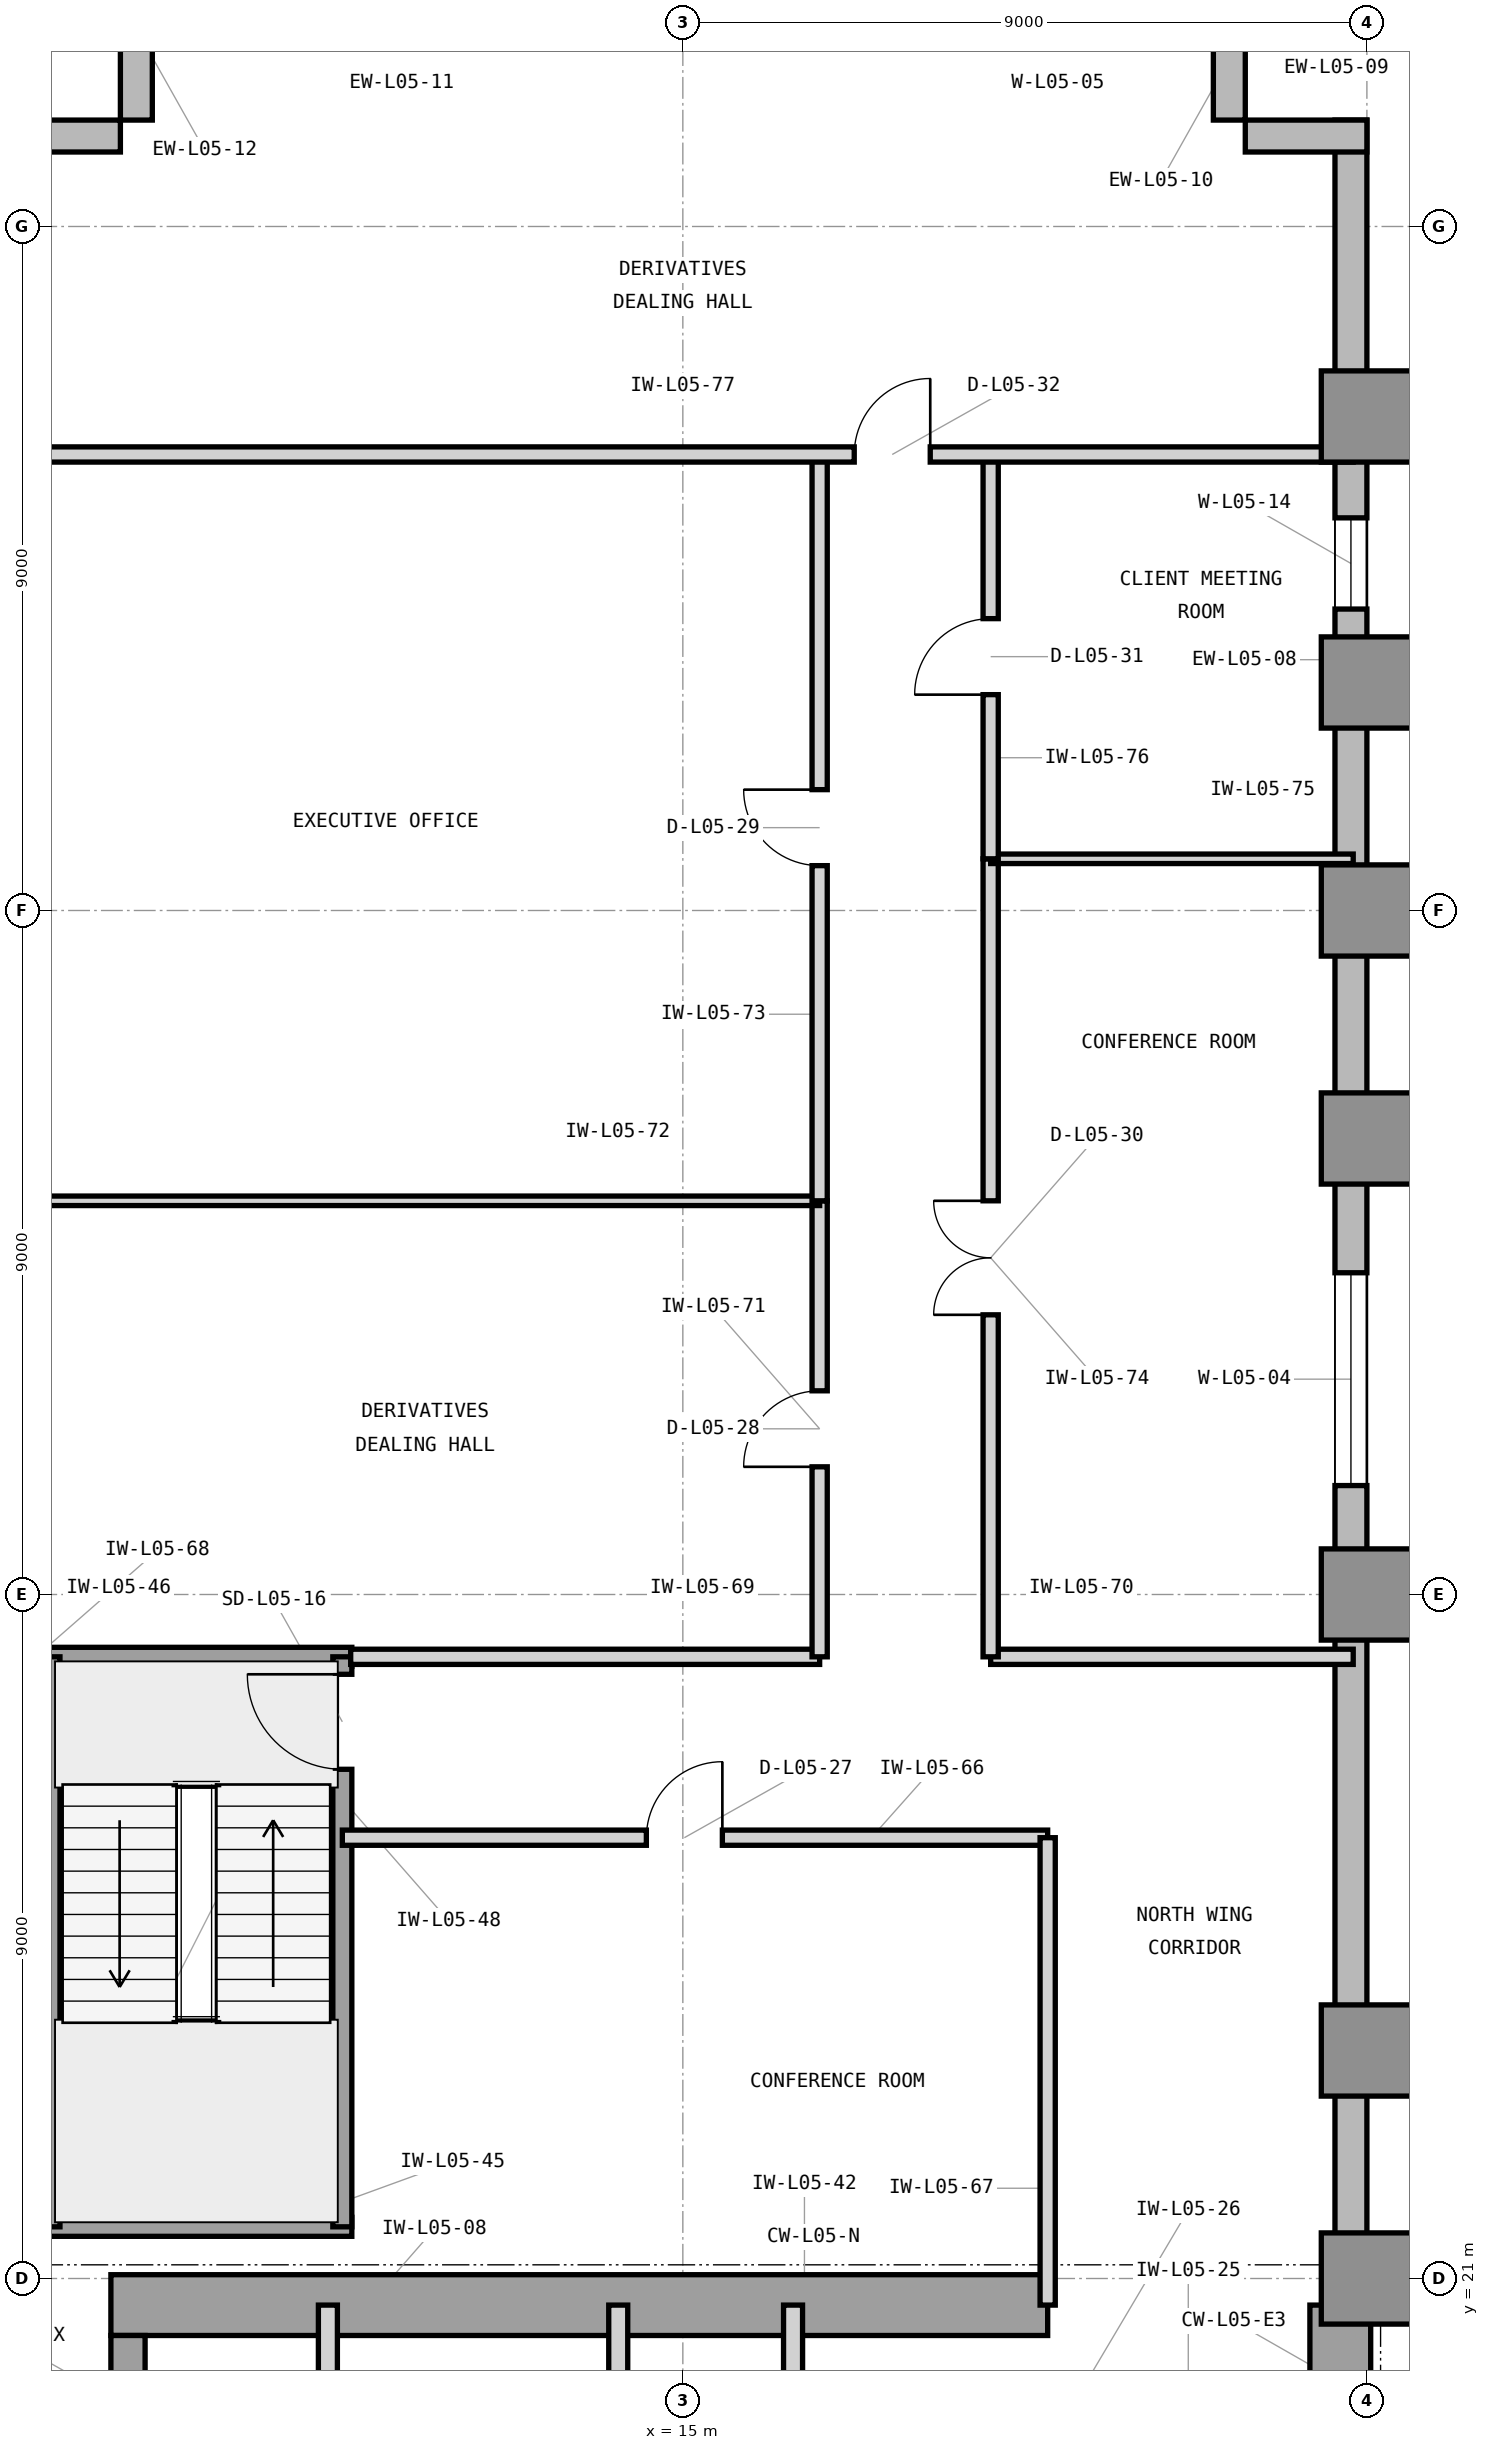
"""IFC4 building model, lengths in metres.
Left out: names, types, materials, properties, quantities, classifications, styles, units other than length and angle.
Written with IfcOpenShell. Run it as: python <this file> out.ifc"""

import sys

from ifc_helpers import new_model, si_unit, direction, frame, frame_2d, origin, origin_2d, place, context, subcontext, project, spatial, rectangle, extrude, element, fill, save


model = new_model("IFC4")
c1 = context("Model", 3, precision=1e-05, world=origin(), true_north=direction((0.0, 1.0)))
c2 = subcontext(c1, "Body", "Model", "MODEL_VIEW")
j1 = project(units=[si_unit("LENGTHUNIT", "METRE"), si_unit("PLANEANGLEUNIT", "RADIAN")], contexts=[c1])
p1 = place(None, origin())
s1 = spatial("IfcSite", under=j1, at=p1, CompositionType="ELEMENT")
p2 = place(p1, origin())
s2 = spatial("IfcBuilding", under=s1, at=p2, CompositionType="ELEMENT")
p3 = place(p2, frame((0.0, 0.0, 25.8)))
s3 = spatial("IfcBuildingStorey", under=s2, at=p3, CompositionType="ELEMENT", Elevation=25.8)
p4 = place(p3, frame((7.475, 20.65, 0.0), z_axis=(0.0, 0.0, 1.0), x_axis=(1.0, 0.0, 0.0)))
e1 = element("IfcWall", 1, at=p4, inside=s3, PredefinedType="SHEAR", context=c2, shape_type="SweptSolid", body=[
    extrude(rectangle(XDim=12.325, YDim=0.8, at=frame_2d((6.163, 0.0))), origin(), (0.0, 0.0, 1.0), 4.2),
])
p5 = place(p3, frame((23.65, 16.6, 0.0), z_axis=(0.0, 0.0, 1.0), x_axis=(0.0, 1.0, 0.0)))
e2 = element("IfcWall", 2, at=p5, inside=s3, PredefinedType="SHEAR", context=c2, shape_type="SweptSolid", body=[
    extrude(rectangle(XDim=4.05, YDim=0.8, at=frame_2d((2.025, 0.0))), origin(), (0.0, 0.0, 1.0), 4.2),
])
p6 = place(p3, frame((7.7, 19.575, 0.0), z_axis=(0.0, 0.0, 1.0), x_axis=(0.0, 1.0, 0.0)))
e3 = element("IfcWall", 3, at=p6, inside=s3, PredefinedType="SHEAR", context=c2, shape_type="SweptSolid", body=[
    extrude(rectangle(XDim=0.675, YDim=0.45, at=frame_2d((0.337, 0.0))), origin(), (0.0, 0.0, 1.0), 4.2),
])
for number, where, z_axis, x_axis in (
    (4, (24.0, 21.0, 0.0), (0.0, 0.0, 1.0), (1.0, 0.0, 0.0)),
    (5, (24.0, 24.0, 0.0), (0.0, 0.0, 1.0), (1.0, 0.0, 0.0)),
    (6, (24.0, 30.0, 0.0), (0.0, 0.0, 1.0), (1.0, 0.0, 0.0)),
    (7, (24.0, 36.0, 0.0), (0.0, 0.0, 1.0), (1.0, 0.0, 0.0)),
    (8, (24.0, 39.0, 0.0), (0.0, 0.0, 1.0), (1.0, 0.0, 0.0)),
    (9, (24.0, 42.0, 0.0), (0.0, 0.0, 1.0), (1.0, 0.0, 0.0)),
    (10, (24.0, 45.5, 0.0), (0.0, 0.0, 1.0), (1.0, 0.0, 0.0)),
):
    element("IfcColumn", number, at=place(p3, frame(where, z_axis=z_axis, x_axis=x_axis)), inside=s3, PredefinedType="COLUMN", context=c2, shape_type="SweptSolid", body=[
        extrude(rectangle(XDim=1.2, YDim=1.2, at=origin_2d()), origin(), (0.0, 0.0, 1.0), 4.2),
    ])
p7 = place(p3, frame((23.79, 21.0, 0.0), z_axis=(0.0, 0.0, 1.0), x_axis=(0.0, 1.0, 0.0)))
e11 = element("IfcWall", 11, at=p7, inside=s3, PredefinedType="STANDARD", context=c2, shape_type="SweptSolid", body=[
    extrude(rectangle(XDim=28.4, YDim=0.42, at=frame_2d((14.2, 0.0))), origin(), (0.0, 0.0, 1.0), 3.98),
])
p8 = place(p7, frame((10.433, 0.0, 0.85)))
e12 = element("IfcOpeningElement", 12, at=p8, cuts=e11, PredefinedType="OPENING", context=c2, shape_type="SweptSolid", body=[
    extrude(rectangle(XDim=2.8, YDim=2.45, at=frame_2d((1.4, 1.225))), frame((0.0, 0.22, 0.0), z_axis=(0.0, -1.0, 0.0), x_axis=(1.0, 0.0, 0.0)), (0.0, 0.0, 1.0), 0.44),
])
p9 = place(p7, frame((21.966, 0.0, 0.85)))
e13 = element("IfcOpeningElement", 13, at=p9, cuts=e11, PredefinedType="OPENING", context=c2, shape_type="SweptSolid", body=[
    extrude(rectangle(XDim=1.2, YDim=2.45, at=frame_2d((0.6, 1.225))), frame((0.0, 0.22, 0.0), z_axis=(0.0, -1.0, 0.0), x_axis=(1.0, 0.0, 0.0)), (0.0, 0.0, 1.0), 0.44),
])
for number, where, z_axis, x_axis in (
    (14, (24.0, 49.19, 0.0), (0.0, 0.0, 1.0), (-1.0, 0.0, 0.0)),
    (15, (22.19, 49.4, 0.0), (0.0, 0.0, 1.0), (0.0, 1.0, 0.0)),
    (16, (7.81, 51.0, 0.0), (0.0, 0.0, 1.0), (0.0, -1.0, 0.0)),
    (17, (7.6, 49.19, 0.0), (0.0, 0.0, 1.0), (-1.0, 0.0, 0.0)),
):
    element("IfcWall", number, at=place(p3, frame(where, z_axis=z_axis, x_axis=x_axis)), inside=s3, PredefinedType="STANDARD", context=c2, shape_type="SweptSolid", body=[
        extrude(rectangle(XDim=1.6, YDim=0.42, at=frame_2d((0.8, 0.0))), origin(), (0.0, 0.0, 1.0), 3.98),
    ])
p10 = place(p3, frame((10.33, 19.45, 0.0), z_axis=(0.0, 0.0, 1.0), x_axis=(0.0, 1.0, 0.0)))
e18 = element("IfcWall", 18, at=p10, inside=s3, PredefinedType="PARTITIONING", context=c2, shape_type="SweptSolid", body=[
    extrude(rectangle(XDim=1.2, YDim=0.25, at=frame_2d((0.6, 0.0))), origin(), (0.0, 0.0, 1.0), 3.114),
])
for number, where, z_axis, x_axis in (
    (19, (14.15, 16.7, 0.0), (0.0, 0.0, 1.0), (0.0, 1.0, 0.0)),
    (20, (16.45, 16.7, 0.0), (0.0, 0.0, 1.0), (0.0, 1.0, 0.0)),
):
    element("IfcWall", number, at=place(p3, frame(where, z_axis=z_axis, x_axis=x_axis)), inside=s3, PredefinedType="PARTITIONING", context=c2, shape_type="SweptSolid", body=[
        extrude(rectangle(XDim=3.95, YDim=0.25, at=frame_2d((1.975, 0.0))), origin(), (0.0, 0.0, 1.0), 3.97),
    ])
for number, where, z_axis, x_axis in (
    (21, (6.555, 21.68, 0.0), (0.0, 0.0, 1.0), (1.0, 0.0, 0.0)),
    (22, (6.555, 29.18, 0.0), (0.0, 0.0, 1.0), (1.0, 0.0, 0.0)),
):
    element("IfcWall", number, at=place(p3, frame(where, z_axis=z_axis, x_axis=x_axis)), inside=s3, PredefinedType="SHEAR", context=c2, shape_type="SweptSolid", body=[
        extrude(rectangle(XDim=4.09, YDim=0.25, at=frame_2d((2.045, 0.0))), origin(), (0.0, 0.0, 1.0), 4.2),
    ])
p11 = place(p3, frame((6.68, 21.68, 0.0), z_axis=(0.0, 0.0, 1.0), x_axis=(0.0, 1.0, 0.0)))
e23 = element("IfcWall", 23, at=p11, inside=s3, PredefinedType="SHEAR", context=c2, shape_type="SweptSolid", body=[
    extrude(rectangle(XDim=7.5, YDim=0.25, at=frame_2d((3.75, 0.0))), origin(), (0.0, 0.0, 1.0), 4.2),
])
p12 = place(p3, frame((10.52, 21.68, 0.0), z_axis=(0.0, 0.0, 1.0), x_axis=(0.0, 1.0, 0.0)))
e24 = element("IfcWall", 24, at=p12, inside=s3, PredefinedType="SHEAR", context=c2, shape_type="SweptSolid", body=[
    extrude(rectangle(XDim=7.5, YDim=0.25, at=frame_2d((3.75, 0.0))), origin(), (0.0, 0.0, 1.0), 4.2),
])
p13 = place(p12, frame((6.02, 0.0, 0.0)))
e25 = element("IfcOpeningElement", 25, at=p13, cuts=e24, PredefinedType="OPENING", context=c2, shape_type="SweptSolid", body=[
    extrude(rectangle(XDim=1.25, YDim=2.2, at=frame_2d((0.625, 1.1))), frame((0.0, 0.135, 0.0), z_axis=(0.0, -1.0, 0.0), x_axis=(1.0, 0.0, 0.0)), (0.0, 0.0, 1.0), 0.27),
])
p14 = place(p3, frame((10.52, 26.8, 0.0), z_axis=(0.0, 0.0, 1.0), x_axis=(1.0, 0.0, 0.0)))
e26 = element("IfcWall", 26, at=p14, inside=s3, PredefinedType="PARTITIONING", context=c2, shape_type="SweptSolid", body=[
    extrude(rectangle(XDim=9.28, YDim=0.2, at=frame_2d((4.64, 0.0))), origin(), (0.0, 0.0, 1.0), 3.97),
])
p15 = place(p14, frame((4.0, 0.0, 0.0)))
e27 = element("IfcOpeningElement", 27, at=p15, cuts=e26, PredefinedType="OPENING", context=c2, shape_type="SweptSolid", body=[
    extrude(rectangle(XDim=1.0, YDim=2.15, at=frame_2d((0.5, 1.075))), frame((0.0, 0.11, 0.0), z_axis=(0.0, -1.0, 0.0), x_axis=(1.0, 0.0, 0.0)), (0.0, 0.0, 1.0), 0.22),
])
p16 = place(p3, frame((19.8, 20.65, 0.0), z_axis=(0.0, 0.0, 1.0), x_axis=(0.0, 1.0, 0.0)))
e28 = element("IfcWall", 28, at=p16, inside=s3, PredefinedType="PARTITIONING", context=c2, shape_type="SweptSolid", body=[
    extrude(rectangle(XDim=6.15, YDim=0.2, at=frame_2d((3.075, 0.0))), origin(), (0.0, 0.0, 1.0), 3.97),
])
p17 = place(p3, frame((10.63, 29.18, 0.0), z_axis=(0.0, 0.0, 1.0), x_axis=(1.0, 0.0, 0.0)))
e29 = element("IfcWall", 29, at=p17, inside=s3, PredefinedType="PARTITIONING", context=c2, shape_type="SweptSolid", body=[
    extrude(rectangle(XDim=6.17, YDim=0.2, at=frame_2d((3.085, 0.0))), origin(), (0.0, 0.0, 1.0), 3.97),
])
p18 = place(p3, frame((19.05, 29.18, 0.0), z_axis=(0.0, 0.0, 1.0), x_axis=(1.0, 0.0, 0.0)))
e30 = element("IfcWall", 30, at=p18, inside=s3, PredefinedType="PARTITIONING", context=c2, shape_type="SweptSolid", body=[
    extrude(rectangle(XDim=4.77, YDim=0.2, at=frame_2d((2.385, 0.0))), origin(), (0.0, 0.0, 1.0), 3.97),
])
p19 = place(p3, frame((16.8, 29.18, 0.0), z_axis=(0.0, 0.0, 1.0), x_axis=(0.0, 1.0, 0.0)))
e31 = element("IfcWall", 31, at=p19, inside=s3, PredefinedType="PARTITIONING", context=c2, shape_type="SweptSolid", body=[
    extrude(rectangle(XDim=6.0, YDim=0.2, at=frame_2d((3.0, 0.0))), origin(), (0.0, 0.0, 1.0), 3.97),
])
p20 = place(p19, frame((2.5, 0.0, 0.0)))
e32 = element("IfcOpeningElement", 32, at=p20, cuts=e31, PredefinedType="OPENING", context=c2, shape_type="SweptSolid", body=[
    extrude(rectangle(XDim=1.0, YDim=2.15, at=frame_2d((0.5, 1.075))), frame((0.0, 0.11, 0.0), z_axis=(0.0, -1.0, 0.0), x_axis=(1.0, 0.0, 0.0)), (0.0, 0.0, 1.0), 0.22),
])
p21 = place(p3, frame((6.18, 35.18, 0.0), z_axis=(0.0, 0.0, 1.0), x_axis=(1.0, 0.0, 0.0)))
e33 = element("IfcWall", 33, at=p21, inside=s3, PredefinedType="PARTITIONING", context=c2, shape_type="SweptSolid", body=[
    extrude(rectangle(XDim=10.62, YDim=0.125, at=frame_2d((5.31, 0.0))), origin(), (0.0, 0.0, 1.0), 3.97),
])
p22 = place(p3, frame((16.8, 35.18, 0.0), z_axis=(0.0, 0.0, 1.0), x_axis=(0.0, 1.0, 0.0)))
e34 = element("IfcWall", 34, at=p22, inside=s3, PredefinedType="PARTITIONING", context=c2, shape_type="SweptSolid", body=[
    extrude(rectangle(XDim=9.82, YDim=0.2, at=frame_2d((4.91, 0.0))), origin(), (0.0, 0.0, 1.0), 3.97),
])
p23 = place(p22, frame((4.41, 0.0, 0.0)))
e35 = element("IfcOpeningElement", 35, at=p23, cuts=e34, PredefinedType="OPENING", context=c2, shape_type="SweptSolid", body=[
    extrude(rectangle(XDim=1.0, YDim=2.15, at=frame_2d((0.5, 1.075))), frame((0.0, 0.11, 0.0), z_axis=(0.0, -1.0, 0.0), x_axis=(1.0, 0.0, 0.0)), (0.0, 0.0, 1.0), 0.22),
])
p24 = place(p3, frame((19.05, 29.18, 0.0), z_axis=(0.0, 0.0, 1.0), x_axis=(0.0, 1.0, 0.0)))
e36 = element("IfcWall", 36, at=p24, inside=s3, PredefinedType="PARTITIONING", context=c2, shape_type="SweptSolid", body=[
    extrude(rectangle(XDim=10.5, YDim=0.2, at=frame_2d((5.25, 0.0))), origin(), (0.0, 0.0, 1.0), 3.97),
])
p25 = place(p24, frame((4.5, 0.0, 0.0)))
e37 = element("IfcOpeningElement", 37, at=p25, cuts=e36, PredefinedType="OPENING", context=c2, shape_type="SweptSolid", body=[
    extrude(rectangle(XDim=1.5, YDim=2.3, at=frame_2d((0.75, 1.15))), frame((0.0, 0.11, 0.0), z_axis=(0.0, -1.0, 0.0), x_axis=(1.0, 0.0, 0.0)), (0.0, 0.0, 1.0), 0.22),
])
p26 = place(p3, frame((19.05, 39.68, 0.0), z_axis=(0.0, 0.0, 1.0), x_axis=(1.0, 0.0, 0.0)))
e38 = element("IfcWall", 38, at=p26, inside=s3, PredefinedType="PARTITIONING", context=c2, shape_type="SweptSolid", body=[
    extrude(rectangle(XDim=4.77, YDim=0.125, at=frame_2d((2.385, 0.0))), origin(), (0.0, 0.0, 1.0), 3.97),
])
p27 = place(p3, frame((19.05, 39.68, 0.0), z_axis=(0.0, 0.0, 1.0), x_axis=(0.0, 1.0, 0.0)))
e39 = element("IfcWall", 39, at=p27, inside=s3, PredefinedType="PARTITIONING", context=c2, shape_type="SweptSolid", body=[
    extrude(rectangle(XDim=5.32, YDim=0.2, at=frame_2d((2.66, 0.0))), origin(), (0.0, 0.0, 1.0), 3.97),
])
p28 = place(p27, frame((2.16, 0.0, 0.0)))
e40 = element("IfcOpeningElement", 40, at=p28, cuts=e39, PredefinedType="OPENING", context=c2, shape_type="SweptSolid", body=[
    extrude(rectangle(XDim=1.0, YDim=2.15, at=frame_2d((0.5, 1.075))), frame((0.0, 0.11, 0.0), z_axis=(0.0, -1.0, 0.0), x_axis=(1.0, 0.0, 0.0)), (0.0, 0.0, 1.0), 0.22),
])
p29 = place(p3, frame((6.18, 45.0, 0.0), z_axis=(0.0, 0.0, 1.0), x_axis=(1.0, 0.0, 0.0)))
e41 = element("IfcWall", 41, at=p29, inside=s3, PredefinedType="PARTITIONING", context=c2, shape_type="SweptSolid", body=[
    extrude(rectangle(XDim=17.64, YDim=0.2, at=frame_2d((8.82, 0.0))), origin(), (0.0, 0.0, 1.0), 3.97),
])
p30 = place(p29, frame((11.075, 0.0, 0.0)))
e42 = element("IfcOpeningElement", 42, at=p30, cuts=e41, PredefinedType="OPENING", context=c2, shape_type="SweptSolid", body=[
    extrude(rectangle(XDim=1.0, YDim=2.15, at=frame_2d((0.5, 1.075))), frame((0.0, 0.11, 0.0), z_axis=(0.0, -1.0, 0.0), x_axis=(1.0, 0.0, 0.0)), (0.0, 0.0, 1.0), 0.22),
])
p31 = place(p8, origin())
e43 = element("IfcWindow", 43, at=p31, inside=s3, PartitioningType="SINGLE_PANEL", PredefinedType="WINDOW", context=c2, shape_type="SweptSolid", body=[
    extrude(rectangle(XDim=2.8, YDim=2.45, at=frame_2d((1.4, 1.225))), frame((0.0, 0.11, 0.0), z_axis=(0.0, -1.0, 0.0), x_axis=(1.0, 0.0, 0.0)), (0.0, 0.0, 1.0), 0.06),
])
fill(e12, e43)
p32 = place(p13, origin())
e44 = element("IfcDoor", 44, at=p32, inside=s3, OperationType="SINGLE_SWING_RIGHT", PredefinedType="DOOR", context=c2, shape_type="SweptSolid", body=[
    extrude(rectangle(XDim=1.25, YDim=2.2, at=frame_2d((0.625, 1.1))), frame((0.0, 0.025, 0.0), z_axis=(0.0, -1.0, 0.0), x_axis=(1.0, 0.0, 0.0)), (0.0, 0.0, 1.0), 0.05),
])
fill(e25, e44)
p33 = place(p15, origin())
e45 = element("IfcDoor", 45, at=p33, inside=s3, OperationType="SINGLE_SWING_RIGHT", PredefinedType="DOOR", context=c2, shape_type="SweptSolid", body=[
    extrude(rectangle(XDim=1.0, YDim=2.15, at=frame_2d((0.5, 1.075))), frame((0.0, 0.025, 0.0), z_axis=(0.0, -1.0, 0.0), x_axis=(1.0, 0.0, 0.0)), (0.0, 0.0, 1.0), 0.05),
])
fill(e27, e45)
p34 = place(p20, origin())
e46 = element("IfcDoor", 46, at=p34, inside=s3, OperationType="SINGLE_SWING_LEFT", PredefinedType="DOOR", context=c2, shape_type="SweptSolid", body=[
    extrude(rectangle(XDim=1.0, YDim=2.15, at=frame_2d((0.5, 1.075))), frame((0.0, 0.025, 0.0), z_axis=(0.0, -1.0, 0.0), x_axis=(1.0, 0.0, 0.0)), (0.0, 0.0, 1.0), 0.05),
])
fill(e32, e46)
p35 = place(p23, origin())
e47 = element("IfcDoor", 47, at=p35, inside=s3, OperationType="SINGLE_SWING_RIGHT", PredefinedType="DOOR", context=c2, shape_type="SweptSolid", body=[
    extrude(rectangle(XDim=1.0, YDim=2.15, at=frame_2d((0.5, 1.075))), frame((0.0, 0.025, 0.0), z_axis=(0.0, -1.0, 0.0), x_axis=(1.0, 0.0, 0.0)), (0.0, 0.0, 1.0), 0.05),
])
fill(e35, e47)
p36 = place(p25, origin())
e48 = element("IfcDoor", 48, at=p36, inside=s3, OperationType="DOUBLE_DOOR_SINGLE_SWING", PredefinedType="DOOR", context=c2, shape_type="SweptSolid", body=[
    extrude(rectangle(XDim=1.5, YDim=2.3, at=frame_2d((0.75, 1.15))), frame((0.0, 0.025, 0.0), z_axis=(0.0, -1.0, 0.0), x_axis=(1.0, 0.0, 0.0)), (0.0, 0.0, 1.0), 0.05),
])
fill(e37, e48)
p37 = place(p28, origin())
e49 = element("IfcDoor", 49, at=p37, inside=s3, OperationType="SINGLE_SWING_LEFT", PredefinedType="DOOR", context=c2, shape_type="SweptSolid", body=[
    extrude(rectangle(XDim=1.0, YDim=2.15, at=frame_2d((0.5, 1.075))), frame((0.0, 0.025, 0.0), z_axis=(0.0, -1.0, 0.0), x_axis=(1.0, 0.0, 0.0)), (0.0, 0.0, 1.0), 0.05),
])
fill(e40, e49)
p38 = place(p30, origin())
e50 = element("IfcDoor", 50, at=p38, inside=s3, OperationType="SINGLE_SWING_RIGHT", PredefinedType="DOOR", context=c2, shape_type="SweptSolid", body=[
    extrude(rectangle(XDim=1.0, YDim=2.15, at=frame_2d((0.5, 1.075))), frame((0.0, 0.025, 0.0), z_axis=(0.0, -1.0, 0.0), x_axis=(1.0, 0.0, 0.0)), (0.0, 0.0, 1.0), 0.05),
])
fill(e42, e50)
p39 = place(p9, origin())
e51 = element("IfcWindow", 51, at=p39, inside=s3, PartitioningType="SINGLE_PANEL", PredefinedType="WINDOW", context=c2, shape_type="SweptSolid", body=[
    extrude(rectangle(XDim=1.2, YDim=2.45, at=frame_2d((0.6, 1.225))), frame((0.0, 0.11, 0.0), z_axis=(0.0, -1.0, 0.0), x_axis=(1.0, 0.0, 0.0)), (0.0, 0.0, 1.0), 0.06),
])
fill(e13, e51)
save(model, sys.argv[1])
